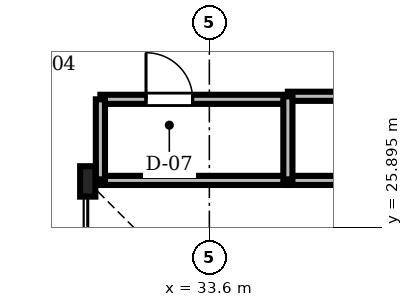
"""IFC4 building model, lengths in metres.
Left out: names, types, materials, properties, quantities, classifications, styles, units other than length and angle.
Written with IfcOpenShell. Run it as: python <this file> out.ifc"""

import sys

from ifc_helpers import new_model, si_unit, direction, frame, frame_2d, origin, origin_2d, place, context, subcontext, project, spatial, rectangle, i_section, extrude, source, transform, mapped, element, fill, save


model = new_model("IFC4")
c1 = context("Model", 3, precision=1e-05, world=origin(), true_north=direction((0.0, 1.0)))
c2 = subcontext(c1, "Body", "Model", "MODEL_VIEW")
j1 = project(units=[si_unit("LENGTHUNIT", "METRE"), si_unit("PLANEANGLEUNIT", "RADIAN")], contexts=[c1])
p1 = place(None, origin())
s1 = spatial("IfcSite", under=j1, at=p1, CompositionType="ELEMENT")
p2 = place(p1, origin())
s2 = spatial("IfcBuilding", under=s1, at=p2, CompositionType="ELEMENT")
p3 = place(p2, frame((0.0, 0.0, 254.55)))
s3 = spatial("IfcBuildingStorey", under=s2, at=p3, CompositionType="ELEMENT", Elevation=254.55)
m1 = source(origin(), c2, "Body", "SweptSolid", [
    extrude(i_section(OverallWidth=0.3, OverallDepth=0.6, WebThickness=0.015, FlangeThickness=0.03, FilletRadius=0.027, at=origin_2d()), origin(), (0.0, 0.0, 1.0), 3.65),
])
p4 = place(p3, frame((31.2, 26.8, 0.0), z_axis=(0.0, 0.0, 1.0), x_axis=(1.0, 0.0, 0.0)))
e1 = element("IfcColumn", 1, at=p4, inside=s3, PredefinedType="COLUMN", context=c2, shape_type="MappedRepresentation", body=[
    mapped(m1, transform((0.0, 0.0, 0.0), scale=1.0)),
])
m2 = source(origin(), c2, "Body", "SweptSolid", [
    extrude(rectangle(XDim=3.7, YDim=0.18, at=frame_2d((1.85, 0.0))), origin(), (0.0, 0.0, 1.0), 3.282),
])
p5 = place(p3, frame((31.45, 28.42, 0.0), z_axis=(0.0, 0.0, 1.0), x_axis=(1.0, 0.0, 0.0)))
e2 = element("IfcWall", 2, at=p5, inside=s3, PredefinedType="PARTITIONING", context=c2, shape_type="MappedRepresentation", body=[
    mapped(m2, transform((0.0, 0.0, 0.0), scale=1.0)),
])
m3 = source(origin(), c2, "Body", "SweptSolid", [
    extrude(rectangle(XDim=0.92, YDim=2.1, at=frame_2d((0.46, 1.05))), frame((0.0, 0.1, 0.0), z_axis=(0.0, -1.0, 0.0), x_axis=(1.0, 0.0, 0.0)), (0.0, 0.0, 1.0), 0.2),
])
p6 = place(p5, frame((0.9, 0.0, 0.0)))
e3 = element("IfcOpeningElement", 3, at=p6, cuts=e2, PredefinedType="OPENING", context=c2, shape_type="MappedRepresentation", body=[
    mapped(m3, transform((0.0, 0.0, 0.0), scale=1.0)),
])
m4 = source(origin(), c2, "Body", "SweptSolid", [
    extrude(rectangle(XDim=3.37, YDim=0.18, at=frame_2d((1.685, 0.0))), origin(), (0.0, 0.0, 1.0), 3.65),
])
p7 = place(p3, frame((35.15, 28.48, 0.0), z_axis=(0.0, 0.0, 1.0), x_axis=(1.0, 0.0, 0.0)))
e4 = element("IfcWall", 4, at=p7, inside=s3, PredefinedType="PARTITIONING", context=c2, shape_type="MappedRepresentation", body=[
    mapped(m4, transform((0.0, 0.0, 0.0), scale=1.0)),
])
m5 = source(origin(), c2, "Body", "SweptSolid", [
    extrude(rectangle(XDim=0.95, YDim=2.15, at=frame_2d((0.475, 1.075))), frame((0.0, 0.1, 0.0), z_axis=(0.0, -1.0, 0.0), x_axis=(1.0, 0.0, 0.0)), (0.0, 0.0, 1.0), 0.2),
])
p8 = place(p7, frame((1.775, 0.0, 0.0)))
e5 = element("IfcOpeningElement", 5, at=p8, cuts=e4, PredefinedType="OPENING", context=c2, shape_type="MappedRepresentation", body=[
    mapped(m5, transform((0.0, 0.0, 0.0), scale=1.0)),
])
m6 = source(origin(), c2, "Body", "SweptSolid", [
    extrude(rectangle(XDim=3.7, YDim=0.18, at=frame_2d((1.85, 0.0))), origin(), (0.0, 0.0, 1.0), 3.192),
])
p9 = place(p3, frame((31.45, 26.82, 0.0), z_axis=(0.0, 0.0, 1.0), x_axis=(1.0, 0.0, 0.0)))
e6 = element("IfcWall", 6, at=p9, inside=s3, PredefinedType="PARTITIONING", context=c2, shape_type="MappedRepresentation", body=[
    mapped(m6, transform((0.0, 0.0, 0.0), scale=1.0)),
])
m7 = source(origin(), c2, "Body", "SweptSolid", [
    extrude(rectangle(XDim=3.37, YDim=0.18, at=frame_2d((1.685, 0.0))), origin(), (0.0, 0.0, 1.0), 3.192),
])
p10 = place(p3, frame((35.15, 26.82, 0.0), z_axis=(0.0, 0.0, 1.0), x_axis=(1.0, 0.0, 0.0)))
e7 = element("IfcWall", 7, at=p10, inside=s3, PredefinedType="PARTITIONING", context=c2, shape_type="MappedRepresentation", body=[
    mapped(m7, transform((0.0, 0.0, 0.0), scale=1.0)),
])
m8 = source(origin(), c2, "Body", "SweptSolid", [
    extrude(rectangle(XDim=1.66, YDim=0.18, at=frame_2d((0.83, 0.0))), origin(), (0.0, 0.0, 1.0), 3.192),
])
p11 = place(p3, frame((35.15, 26.82, 0.0), z_axis=(0.0, 0.0, 1.0), x_axis=(0.0, 1.0, 0.0)))
e8 = element("IfcWall", 8, at=p11, inside=s3, PredefinedType="PARTITIONING", context=c2, shape_type="MappedRepresentation", body=[
    mapped(m8, transform((0.0, 0.0, 0.0), scale=1.0)),
])
m9 = source(origin(), c2, "Body", "SweptSolid", [
    extrude(rectangle(XDim=1.6, YDim=0.18, at=frame_2d((0.8, 0.0))), origin(), (0.0, 0.0, 1.0), 3.192),
])
p12 = place(p3, frame((31.45, 26.82, 0.0), z_axis=(0.0, 0.0, 1.0), x_axis=(0.0, 1.0, 0.0)))
e9 = element("IfcWall", 9, at=p12, inside=s3, PredefinedType="PARTITIONING", context=c2, shape_type="MappedRepresentation", body=[
    mapped(m9, transform((0.0, 0.0, 0.0), scale=1.0)),
])
m10 = source(origin(), c2, "Body", "SweptSolid", [
    extrude(rectangle(XDim=0.92, YDim=2.1, at=frame_2d((0.46, 1.05))), frame((0.0, 0.025, 0.0), z_axis=(0.0, -1.0, 0.0), x_axis=(1.0, 0.0, 0.0)), (0.0, 0.0, 1.0), 0.05),
])
p13 = place(p6, origin())
e10 = element("IfcDoor", 10, at=p13, inside=s3, OperationType="SINGLE_SWING_LEFT", PredefinedType="DOOR", context=c2, shape_type="MappedRepresentation", body=[
    mapped(m10, transform((0.0, 0.0, 0.0), scale=1.0)),
])
fill(e3, e10)
save(model, sys.argv[1])
